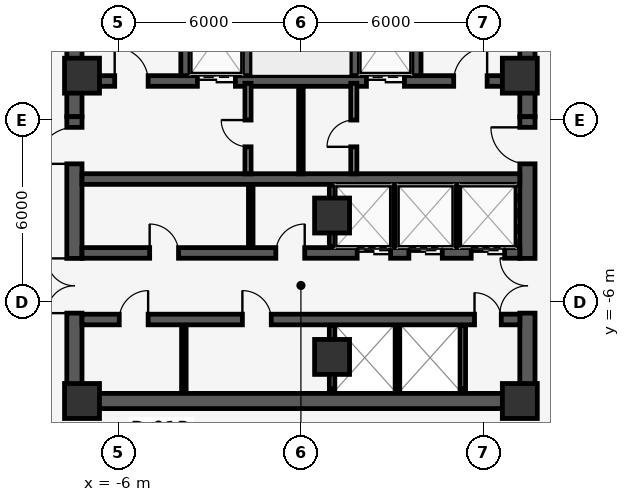
"""IFC4 building model, lengths in metres.
Left out: names, types, materials, properties, quantities, classifications, styles, units other than length and angle.
Written with IfcOpenShell. Run it as: python <this file> out.ifc"""

import sys

from ifc_helpers import new_model, si_unit, direction, frame, frame_2d, origin, origin_2d, place, context, subcontext, project, spatial, rectangle, extrude, element, fill, save


model = new_model("IFC4")
c1 = context("Model", 3, precision=1e-05, world=origin(), true_north=direction((0.0, 1.0)))
c2 = subcontext(c1, "Body", "Model", "MODEL_VIEW")
j1 = project(units=[si_unit("LENGTHUNIT", "METRE"), si_unit("PLANEANGLEUNIT", "RADIAN")], contexts=[c1])
p1 = place(None, origin())
s1 = spatial("IfcSite", under=j1, at=p1, CompositionType="ELEMENT")
p2 = place(p1, origin())
s2 = spatial("IfcBuilding", under=s1, at=p2, CompositionType="ELEMENT")
p3 = place(p2, frame((0.0, 0.0, 236.3)))
s3 = spatial("IfcBuildingStorey", under=s2, at=p3, CompositionType="ELEMENT", Elevation=236.3)
p4 = place(p3, frame((-7.2, 1.275, 0.0), z_axis=(0.0, 0.0, 1.0), x_axis=(1.0, 0.0, 0.0)))
e1 = element("IfcWall", 1, at=p4, inside=s3, PredefinedType="SHEAR", context=c2, shape_type="SweptSolid", body=[
    extrude(rectangle(XDim=14.4, YDim=0.35, at=frame_2d((7.2, 0.0))), origin(), (0.0, 0.0, 1.0), 3.85),
])
p5 = place(p4, frame((3.795, 0.0, 0.0)))
e2 = element("IfcOpeningElement", 2, at=p5, cuts=e1, PredefinedType="OPENING", context=c2, shape_type="SweptSolid", body=[
    extrude(rectangle(XDim=1.25, YDim=2.25, at=frame_2d((0.625, 1.125))), frame((0.0, 0.185, 0.0), z_axis=(0.0, -1.0, 0.0), x_axis=(1.0, 0.0, 0.0)), (0.0, 0.0, 1.0), 0.37),
])
p6 = place(p4, frame((9.355, 0.0, 0.0)))
e3 = element("IfcOpeningElement", 3, at=p6, cuts=e1, PredefinedType="OPENING", context=c2, shape_type="SweptSolid", body=[
    extrude(rectangle(XDim=1.25, YDim=2.25, at=frame_2d((0.625, 1.125))), frame((0.0, 0.185, 0.0), z_axis=(0.0, -1.0, 0.0), x_axis=(1.0, 0.0, 0.0)), (0.0, 0.0, 1.0), 0.37),
])
p7 = place(p4, frame((1.075, 0.0, 0.0)))
e4 = element("IfcOpeningElement", 4, at=p7, cuts=e1, PredefinedType="OPENING", context=c2, shape_type="SweptSolid", body=[
    extrude(rectangle(XDim=1.1, YDim=2.15, at=frame_2d((0.55, 1.075))), frame((0.0, 0.185, 0.0), z_axis=(0.0, -1.0, 0.0), x_axis=(1.0, 0.0, 0.0)), (0.0, 0.0, 1.0), 0.37),
])
p8 = place(p4, frame((12.225, 0.0, 0.0)))
e5 = element("IfcOpeningElement", 5, at=p8, cuts=e1, PredefinedType="OPENING", context=c2, shape_type="SweptSolid", body=[
    extrude(rectangle(XDim=1.1, YDim=2.15, at=frame_2d((0.55, 1.075))), frame((0.0, 0.185, 0.0), z_axis=(0.0, -1.0, 0.0), x_axis=(1.0, 0.0, 0.0)), (0.0, 0.0, 1.0), 0.37),
])
for number, where, z_axis, x_axis in (
    (6, (-3.8, 1.45, 0.0), (0.0, 0.0, 1.0), (0.0, 1.0, 0.0)),
    (7, (-1.775, 1.45, 0.0), (0.0, 0.0, 1.0), (0.0, 1.0, 0.0)),
    (8, (1.775, 1.45, 0.0), (0.0, 0.0, 1.0), (0.0, 1.0, 0.0)),
    (9, (3.8, 1.45, 0.0), (0.0, 0.0, 1.0), (0.0, 1.0, 0.0)),
):
    element("IfcWall", number, at=place(p3, frame(where, z_axis=z_axis, x_axis=x_axis)), inside=s3, PredefinedType="SHEAR", context=c2, shape_type="SweptSolid", body=[
        extrude(rectangle(XDim=7.7, YDim=0.3, at=frame_2d((3.85, 0.0))), origin(), (0.0, 0.0, 1.0), 3.85),
    ])
for number, where, z_axis, x_axis in (
    (10, (-7.45, 0.1, 0.0), (0.0, 0.0, 1.0), (0.0, 1.0, 0.0)),
    (11, (7.45, 0.1, 0.0), (0.0, 0.0, 1.0), (0.0, 1.0, 0.0)),
):
    element("IfcWall", number, at=place(p3, frame(where, z_axis=z_axis, x_axis=x_axis)), inside=s3, PredefinedType="SHEAR", context=c2, shape_type="SweptSolid", body=[
        extrude(rectangle(XDim=9.05, YDim=0.5, at=frame_2d((4.525, 0.0))), origin(), (0.0, 0.0, 1.0), 3.85),
    ])
p9 = place(p3, frame((-7.45, -9.0, 0.0), z_axis=(0.0, 0.0, 1.0), x_axis=(0.0, 1.0, 0.0)))
e12 = element("IfcWall", 12, at=p9, inside=s3, PredefinedType="SHEAR", context=c2, shape_type="SweptSolid", body=[
    extrude(rectangle(XDim=9.1, YDim=0.5, at=frame_2d((4.55, 0.0))), origin(), (0.0, 0.0, 1.0), 3.85),
])
p10 = place(p9, frame((2.64, 0.0, 0.0)))
e13 = element("IfcOpeningElement", 13, at=p10, cuts=e12, PredefinedType="OPENING", context=c2, shape_type="SweptSolid", body=[
    extrude(rectangle(XDim=1.8, YDim=2.2, at=frame_2d((0.9, 1.1))), frame((0.0, 0.26, 0.0), z_axis=(0.0, -1.0, 0.0), x_axis=(1.0, 0.0, 0.0)), (0.0, 0.0, 1.0), 0.52),
])
p11 = place(p9, frame((7.55, 0.0, 0.0)))
e14 = element("IfcOpeningElement", 14, at=p11, cuts=e12, PredefinedType="OPENING", context=c2, shape_type="SweptSolid", body=[
    extrude(rectangle(XDim=1.2, YDim=2.15, at=frame_2d((0.6, 1.075))), frame((0.0, 0.26, 0.0), z_axis=(0.0, -1.0, 0.0), x_axis=(1.0, 0.0, 0.0)), (0.0, 0.0, 1.0), 0.52),
])
p12 = place(p3, frame((7.45, -9.0, 0.0), z_axis=(0.0, 0.0, 1.0), x_axis=(0.0, 1.0, 0.0)))
e15 = element("IfcWall", 15, at=p12, inside=s3, PredefinedType="SHEAR", context=c2, shape_type="SweptSolid", body=[
    extrude(rectangle(XDim=9.1, YDim=0.5, at=frame_2d((4.55, 0.0))), origin(), (0.0, 0.0, 1.0), 3.85),
])
p13 = place(p12, frame((2.64, 0.0, 0.0)))
e16 = element("IfcOpeningElement", 16, at=p13, cuts=e15, PredefinedType="OPENING", context=c2, shape_type="SweptSolid", body=[
    extrude(rectangle(XDim=1.8, YDim=2.2, at=frame_2d((0.9, 1.1))), frame((0.0, 0.26, 0.0), z_axis=(0.0, -1.0, 0.0), x_axis=(1.0, 0.0, 0.0)), (0.0, 0.0, 1.0), 0.52),
])
p14 = place(p12, frame((7.55, 0.0, 0.0)))
e17 = element("IfcOpeningElement", 17, at=p14, cuts=e15, PredefinedType="OPENING", context=c2, shape_type="SweptSolid", body=[
    extrude(rectangle(XDim=1.2, YDim=2.15, at=frame_2d((0.6, 1.075))), frame((0.0, 0.26, 0.0), z_axis=(0.0, -1.0, 0.0), x_axis=(1.0, 0.0, 0.0)), (0.0, 0.0, 1.0), 0.52),
])
p15 = place(p3, frame((-7.45, -9.25, 0.0), z_axis=(0.0, 0.0, 1.0), x_axis=(1.0, 0.0, 0.0)))
e18 = element("IfcWall", 18, at=p15, inside=s3, PredefinedType="SHEAR", context=c2, shape_type="SweptSolid", body=[
    extrude(rectangle(XDim=14.9, YDim=0.5, at=frame_2d((7.45, 0.0))), origin(), (0.0, 0.0, 1.0), 3.85),
])
p16 = place(p3, frame((-7.2, -1.95, 0.0), z_axis=(0.0, 0.0, 1.0), x_axis=(1.0, 0.0, 0.0)))
e19 = element("IfcWall", 19, at=p16, inside=s3, PredefinedType="SHEAR", context=c2, shape_type="SweptSolid", body=[
    extrude(rectangle(XDim=14.4, YDim=0.35, at=frame_2d((7.2, 0.0))), origin(), (0.0, 0.0, 1.0), 3.85),
])
p17 = place(p3, frame((-7.2, -4.38, 0.0), z_axis=(0.0, 0.0, 1.0), x_axis=(1.0, 0.0, 0.0)))
e20 = element("IfcWall", 20, at=p17, inside=s3, PredefinedType="SHEAR", context=c2, shape_type="SweptSolid", body=[
    extrude(rectangle(XDim=14.4, YDim=0.35, at=frame_2d((7.2, 0.0))), origin(), (0.0, 0.0, 1.0), 3.85),
])
p18 = place(p17, frame((9.05, 0.0, 0.0)))
e21 = element("IfcOpeningElement", 21, at=p18, cuts=e20, PredefinedType="OPENING", context=c2, shape_type="SweptSolid", body=[
    extrude(rectangle(XDim=1.1, YDim=2.2, at=frame_2d((0.55, 1.1))), frame((0.0, 0.185, 0.0), z_axis=(0.0, -1.0, 0.0), x_axis=(1.0, 0.0, 0.0)), (0.0, 0.0, 1.0), 0.37),
])
p19 = place(p17, frame((10.75, 0.0, 0.0)))
e22 = element("IfcOpeningElement", 22, at=p19, cuts=e20, PredefinedType="OPENING", context=c2, shape_type="SweptSolid", body=[
    extrude(rectangle(XDim=1.1, YDim=2.2, at=frame_2d((0.55, 1.1))), frame((0.0, 0.185, 0.0), z_axis=(0.0, -1.0, 0.0), x_axis=(1.0, 0.0, 0.0)), (0.0, 0.0, 1.0), 0.37),
])
p20 = place(p17, frame((12.8, 0.0, 0.0)))
e23 = element("IfcOpeningElement", 23, at=p20, cuts=e20, PredefinedType="OPENING", context=c2, shape_type="SweptSolid", body=[
    extrude(rectangle(XDim=1.1, YDim=2.2, at=frame_2d((0.55, 1.1))), frame((0.0, 0.185, 0.0), z_axis=(0.0, -1.0, 0.0), x_axis=(1.0, 0.0, 0.0)), (0.0, 0.0, 1.0), 0.37),
])
p21 = place(p17, frame((2.225, 0.0, 0.0)))
e24 = element("IfcOpeningElement", 24, at=p21, cuts=e20, PredefinedType="OPENING", context=c2, shape_type="SweptSolid", body=[
    extrude(rectangle(XDim=0.95, YDim=2.15, at=frame_2d((0.475, 1.075))), frame((0.0, 0.185, 0.0), z_axis=(0.0, -1.0, 0.0), x_axis=(1.0, 0.0, 0.0)), (0.0, 0.0, 1.0), 0.37),
])
p22 = place(p17, frame((6.375, 0.0, 0.0)))
e25 = element("IfcOpeningElement", 25, at=p22, cuts=e20, PredefinedType="OPENING", context=c2, shape_type="SweptSolid", body=[
    extrude(rectangle(XDim=0.95, YDim=2.15, at=frame_2d((0.475, 1.075))), frame((0.0, 0.185, 0.0), z_axis=(0.0, -1.0, 0.0), x_axis=(1.0, 0.0, 0.0)), (0.0, 0.0, 1.0), 0.37),
])
p23 = place(p3, frame((-7.2, -6.57, 0.0), z_axis=(0.0, 0.0, 1.0), x_axis=(1.0, 0.0, 0.0)))
e26 = element("IfcWall", 26, at=p23, inside=s3, PredefinedType="SHEAR", context=c2, shape_type="SweptSolid", body=[
    extrude(rectangle(XDim=14.4, YDim=0.35, at=frame_2d((7.2, 0.0))), origin(), (0.0, 0.0, 1.0), 3.85),
])
p24 = place(p23, frame((1.225, 0.0, 0.0)))
e27 = element("IfcOpeningElement", 27, at=p24, cuts=e26, PredefinedType="OPENING", context=c2, shape_type="SweptSolid", body=[
    extrude(rectangle(XDim=0.95, YDim=2.15, at=frame_2d((0.475, 1.075))), frame((0.0, 0.185, 0.0), z_axis=(0.0, -1.0, 0.0), x_axis=(1.0, 0.0, 0.0)), (0.0, 0.0, 1.0), 0.37),
])
p25 = place(p23, frame((5.275, 0.0, 0.0)))
e28 = element("IfcOpeningElement", 28, at=p25, cuts=e26, PredefinedType="OPENING", context=c2, shape_type="SweptSolid", body=[
    extrude(rectangle(XDim=0.95, YDim=2.15, at=frame_2d((0.475, 1.075))), frame((0.0, 0.185, 0.0), z_axis=(0.0, -1.0, 0.0), x_axis=(1.0, 0.0, 0.0)), (0.0, 0.0, 1.0), 0.37),
])
p26 = place(p23, frame((12.91, 0.0, 0.0)))
e29 = element("IfcOpeningElement", 29, at=p26, cuts=e26, PredefinedType="OPENING", context=c2, shape_type="SweptSolid", body=[
    extrude(rectangle(XDim=0.88, YDim=2.15, at=frame_2d((0.44, 1.075))), frame((0.0, 0.185, 0.0), z_axis=(0.0, -1.0, 0.0), x_axis=(1.0, 0.0, 0.0)), (0.0, 0.0, 1.0), 0.37),
])
for number, where, z_axis, x_axis in (
    (30, (-7.2, -9.25, 0.0), (0.0, 0.0, 1.0), (1.0, 0.0, 0.0)),
    (31, (7.2, -9.25, 0.0), (0.0, 0.0, 1.0), (1.0, 0.0, 0.0)),
    (32, (7.2, 1.45, 0.0), (0.0, 0.0, 1.0), (1.0, 0.0, 0.0)),
    (33, (-7.2, 1.45, 0.0), (0.0, 0.0, 1.0), (1.0, 0.0, 0.0)),
    (34, (1.025, -3.15, 0.0), (0.0, 0.0, 1.0), (1.0, 0.0, 0.0)),
    (35, (1.025, -7.8, 0.0), (0.0, 0.0, 1.0), (1.0, 0.0, 0.0)),
):
    element("IfcColumn", number, at=place(p3, frame(where, z_axis=z_axis, x_axis=x_axis)), inside=s3, PredefinedType="COLUMN", context=c2, shape_type="SweptSolid", body=[
        extrude(rectangle(XDim=1.15, YDim=1.15, at=origin_2d()), origin(), (0.0, 0.0, 1.0), 4.1),
    ])
p27 = place(p3, frame((30.935, 2.916, 0.0), z_axis=(0.0, 0.0, 1.0), x_axis=(-0.743143233829, -0.66913237406, 0.0)))
e36 = element("IfcWall", 36, at=p27, inside=s3, PredefinedType="STANDARD", context=c2, shape_type="SweptSolid", body=[
    extrude(rectangle(XDim=49.88, YDim=0.28, at=frame_2d((24.94, 0.0))), origin(), (0.0, 0.0, 1.0), 3.85),
])
p28 = place(p27, frame((24.44, 0.0, 0.0)))
e37 = element("IfcOpeningElement", 37, at=p28, cuts=e36, PredefinedType="OPENING", context=c2, shape_type="SweptSolid", body=[
    extrude(rectangle(XDim=1.0, YDim=2.15, at=frame_2d((0.5, 1.075))), frame((0.0, 0.15, 0.0), z_axis=(0.0, -1.0, 0.0), x_axis=(1.0, 0.0, 0.0)), (0.0, 0.0, 1.0), 0.3),
])
p29 = place(p27, frame((4.74, 0.0, 0.85)))
e38 = element("IfcOpeningElement", 38, at=p29, cuts=e36, PredefinedType="OPENING", context=c2, shape_type="SweptSolid", body=[
    extrude(rectangle(XDim=1.2, YDim=2.2, at=frame_2d((0.6, 1.1))), frame((0.0, 0.15, 0.0), z_axis=(0.0, -1.0, 0.0), x_axis=(1.0, 0.0, 0.0)), (0.0, 0.0, 1.0), 0.3),
])
p30 = place(p27, frame((10.34, 0.0, 0.85)))
e39 = element("IfcOpeningElement", 39, at=p30, cuts=e36, PredefinedType="OPENING", context=c2, shape_type="SweptSolid", body=[
    extrude(rectangle(XDim=1.2, YDim=2.2, at=frame_2d((0.6, 1.1))), frame((0.0, 0.15, 0.0), z_axis=(0.0, -1.0, 0.0), x_axis=(1.0, 0.0, 0.0)), (0.0, 0.0, 1.0), 0.3),
])
p31 = place(p27, frame((27.14, 0.0, 0.85)))
e40 = element("IfcOpeningElement", 40, at=p31, cuts=e36, PredefinedType="OPENING", context=c2, shape_type="SweptSolid", body=[
    extrude(rectangle(XDim=1.2, YDim=2.2, at=frame_2d((0.6, 1.1))), frame((0.0, 0.15, 0.0), z_axis=(0.0, -1.0, 0.0), x_axis=(1.0, 0.0, 0.0)), (0.0, 0.0, 1.0), 0.3),
])
p32 = place(p27, frame((38.34, 0.0, 0.85)))
e41 = element("IfcOpeningElement", 41, at=p32, cuts=e36, PredefinedType="OPENING", context=c2, shape_type="SweptSolid", body=[
    extrude(rectangle(XDim=1.2, YDim=2.2, at=frame_2d((0.6, 1.1))), frame((0.0, 0.15, 0.0), z_axis=(0.0, -1.0, 0.0), x_axis=(1.0, 0.0, 0.0)), (0.0, 0.0, 1.0), 0.3),
])
p33 = place(p27, frame((43.94, 0.0, 0.85)))
e42 = element("IfcOpeningElement", 42, at=p33, cuts=e36, PredefinedType="OPENING", context=c2, shape_type="SweptSolid", body=[
    extrude(rectangle(XDim=1.2, YDim=2.2, at=frame_2d((0.6, 1.1))), frame((0.0, 0.15, 0.0), z_axis=(0.0, -1.0, 0.0), x_axis=(1.0, 0.0, 0.0)), (0.0, 0.0, 1.0), 0.3),
])
p34 = place(p3, frame((1.025, -4.18, 0.0), z_axis=(0.0, 0.0, 1.0), x_axis=(0.0, 1.0, 0.0)))
e43 = element("IfcWall", 43, at=p34, inside=s3, PredefinedType="PARTITIONING", context=c2, shape_type="SweptSolid", body=[
    extrude(rectangle(XDim=2.03, YDim=0.18, at=frame_2d((1.015, 0.0))), origin(), (0.0, 0.0, 1.0), 2.898),
])
for number, where, z_axis, x_axis in (
    (44, (-1.65, -4.18, 0.0), (0.0, 0.0, 1.0), (0.0, 1.0, 0.0)),
    (45, (3.075, -4.18, 0.0), (0.0, 0.0, 1.0), (0.0, 1.0, 0.0)),
    (46, (5.125, -4.18, 0.0), (0.0, 0.0, 1.0), (0.0, 1.0, 0.0)),
):
    element("IfcWall", number, at=place(p3, frame(where, z_axis=z_axis, x_axis=x_axis)), inside=s3, PredefinedType="PARTITIONING", context=c2, shape_type="SweptSolid", body=[
        extrude(rectangle(XDim=2.03, YDim=0.15, at=frame_2d((1.015, 0.0))), origin(), (0.0, 0.0, 1.0), 3.85),
    ])
p35 = place(p3, frame((1.025, -8.85, 0.0), z_axis=(0.0, 0.0, 1.0), x_axis=(0.0, 1.0, 0.0)))
e47 = element("IfcWall", 47, at=p35, inside=s3, PredefinedType="PARTITIONING", context=c2, shape_type="SweptSolid", body=[
    extrude(rectangle(XDim=2.08, YDim=0.18, at=frame_2d((1.04, 0.0))), origin(), (0.0, 0.0, 1.0), 2.898),
])
for number, where, z_axis, x_axis in (
    (48, (-3.85, -8.85, 0.0), (0.0, 0.0, 1.0), (0.0, 1.0, 0.0)),
    (49, (3.175, -8.85, 0.0), (0.0, 0.0, 1.0), (0.0, 1.0, 0.0)),
):
    element("IfcWall", number, at=place(p3, frame(where, z_axis=z_axis, x_axis=x_axis)), inside=s3, PredefinedType="PARTITIONING", context=c2, shape_type="SweptSolid", body=[
        extrude(rectangle(XDim=2.08, YDim=0.15, at=frame_2d((1.04, 0.0))), origin(), (0.0, 0.0, 1.0), 3.85),
    ])
p36 = place(p3, frame((5.325, -8.85, 0.0), z_axis=(0.0, 0.0, 1.0), x_axis=(0.0, 1.0, 0.0)))
e50 = element("IfcWall", 50, at=p36, inside=s3, PredefinedType="PARTITIONING", context=c2, shape_type="SweptSolid", body=[
    extrude(rectangle(XDim=2.08, YDim=0.18, at=frame_2d((1.04, 0.0))), origin(), (0.0, 0.0, 1.0), 3.85),
])
p37 = place(p3, frame((-1.74, -1.78, 0.0), z_axis=(0.0, 0.0, 1.0), x_axis=(0.0, 1.0, 0.0)))
e51 = element("IfcWall", 51, at=p37, inside=s3, PredefinedType="PARTITIONING", context=c2, shape_type="SweptSolid", body=[
    extrude(rectangle(XDim=2.98, YDim=0.2, at=frame_2d((1.49, 0.0))), origin(), (0.0, 0.0, 1.0), 3.85),
])
p38 = place(p37, frame((0.89, 0.0, 0.0)))
e52 = element("IfcOpeningElement", 52, at=p38, cuts=e51, PredefinedType="OPENING", context=c2, shape_type="SweptSolid", body=[
    extrude(rectangle(XDim=0.88, YDim=2.15, at=frame_2d((0.44, 1.075))), frame((0.0, 0.11, 0.0), z_axis=(0.0, -1.0, 0.0), x_axis=(1.0, 0.0, 0.0)), (0.0, 0.0, 1.0), 0.22),
])
p39 = place(p3, frame((1.74, -1.78, 0.0), z_axis=(0.0, 0.0, 1.0), x_axis=(0.0, 1.0, 0.0)))
e53 = element("IfcWall", 53, at=p39, inside=s3, PredefinedType="PARTITIONING", context=c2, shape_type="SweptSolid", body=[
    extrude(rectangle(XDim=2.98, YDim=0.2, at=frame_2d((1.49, 0.0))), origin(), (0.0, 0.0, 1.0), 3.85),
])
p40 = place(p39, frame((0.89, 0.0, 0.0)))
e54 = element("IfcOpeningElement", 54, at=p40, cuts=e53, PredefinedType="OPENING", context=c2, shape_type="SweptSolid", body=[
    extrude(rectangle(XDim=0.88, YDim=2.15, at=frame_2d((0.44, 1.075))), frame((0.0, 0.11, 0.0), z_axis=(0.0, -1.0, 0.0), x_axis=(1.0, 0.0, 0.0)), (0.0, 0.0, 1.0), 0.22),
])
p41 = place(p3, frame((0.0, -1.78, 0.0), z_axis=(0.0, 0.0, 1.0), x_axis=(0.0, 1.0, 0.0)))
e55 = element("IfcWall", 55, at=p41, inside=s3, PredefinedType="PARTITIONING", context=c2, shape_type="SweptSolid", body=[
    extrude(rectangle(XDim=2.83, YDim=0.15, at=frame_2d((1.415, 0.0))), origin(), (0.0, 0.0, 1.0), 3.85),
])
p42 = place(p18, origin())
e56 = element("IfcDoor", 56, at=p42, inside=s3, OperationType="DOUBLE_DOOR_SLIDING", PredefinedType="DOOR", context=c2, shape_type="SweptSolid", body=[
    extrude(rectangle(XDim=1.1, YDim=2.2, at=frame_2d((0.55, 1.1))), frame((0.0, 0.025, 0.0), z_axis=(0.0, -1.0, 0.0), x_axis=(1.0, 0.0, 0.0)), (0.0, 0.0, 1.0), 0.05),
])
fill(e21, e56)
p43 = place(p19, origin())
e57 = element("IfcDoor", 57, at=p43, inside=s3, OperationType="DOUBLE_DOOR_SLIDING", PredefinedType="DOOR", context=c2, shape_type="SweptSolid", body=[
    extrude(rectangle(XDim=1.1, YDim=2.2, at=frame_2d((0.55, 1.1))), frame((0.0, 0.025, 0.0), z_axis=(0.0, -1.0, 0.0), x_axis=(1.0, 0.0, 0.0)), (0.0, 0.0, 1.0), 0.05),
])
fill(e22, e57)
p44 = place(p20, origin())
e58 = element("IfcDoor", 58, at=p44, inside=s3, OperationType="DOUBLE_DOOR_SLIDING", PredefinedType="DOOR", context=c2, shape_type="SweptSolid", body=[
    extrude(rectangle(XDim=1.1, YDim=2.2, at=frame_2d((0.55, 1.1))), frame((0.0, 0.025, 0.0), z_axis=(0.0, -1.0, 0.0), x_axis=(1.0, 0.0, 0.0)), (0.0, 0.0, 1.0), 0.05),
])
fill(e23, e58)
p45 = place(p5, origin())
e59 = element("IfcDoor", 59, at=p45, inside=s3, OperationType="DOUBLE_DOOR_SLIDING", PredefinedType="DOOR", context=c2, shape_type="SweptSolid", body=[
    extrude(rectangle(XDim=1.25, YDim=2.25, at=frame_2d((0.625, 1.125))), frame((0.0, 0.025, 0.0), z_axis=(0.0, -1.0, 0.0), x_axis=(1.0, 0.0, 0.0)), (0.0, 0.0, 1.0), 0.05),
])
fill(e2, e59)
p46 = place(p6, origin())
e60 = element("IfcDoor", 60, at=p46, inside=s3, OperationType="DOUBLE_DOOR_SLIDING", PredefinedType="DOOR", context=c2, shape_type="SweptSolid", body=[
    extrude(rectangle(XDim=1.25, YDim=2.25, at=frame_2d((0.625, 1.125))), frame((0.0, 0.025, 0.0), z_axis=(0.0, -1.0, 0.0), x_axis=(1.0, 0.0, 0.0)), (0.0, 0.0, 1.0), 0.05),
])
fill(e3, e60)
p47 = place(p7, origin())
e61 = element("IfcDoor", 61, at=p47, inside=s3, OperationType="SINGLE_SWING_LEFT", PredefinedType="DOOR", context=c2, shape_type="SweptSolid", body=[
    extrude(rectangle(XDim=1.1, YDim=2.15, at=frame_2d((0.55, 1.075))), frame((0.0, 0.025, 0.0), z_axis=(0.0, -1.0, 0.0), x_axis=(1.0, 0.0, 0.0)), (0.0, 0.0, 1.0), 0.05),
])
fill(e4, e61)
p48 = place(p8, origin())
e62 = element("IfcDoor", 62, at=p48, inside=s3, OperationType="SINGLE_SWING_RIGHT", PredefinedType="DOOR", context=c2, shape_type="SweptSolid", body=[
    extrude(rectangle(XDim=1.1, YDim=2.15, at=frame_2d((0.55, 1.075))), frame((0.0, 0.025, 0.0), z_axis=(0.0, -1.0, 0.0), x_axis=(1.0, 0.0, 0.0)), (0.0, 0.0, 1.0), 0.05),
])
fill(e5, e62)
p49 = place(p10, origin())
e63 = element("IfcDoor", 63, at=p49, inside=s3, OperationType="DOUBLE_DOOR_SINGLE_SWING", PredefinedType="DOOR", context=c2, shape_type="SweptSolid", body=[
    extrude(rectangle(XDim=1.8, YDim=2.2, at=frame_2d((0.9, 1.1))), frame((0.0, 0.025, 0.0), z_axis=(0.0, -1.0, 0.0), x_axis=(1.0, 0.0, 0.0)), (0.0, 0.0, 1.0), 0.05),
])
fill(e13, e63)
p50 = place(p11, origin())
e64 = element("IfcDoor", 64, at=p50, inside=s3, OperationType="SINGLE_SWING_LEFT", PredefinedType="DOOR", context=c2, shape_type="SweptSolid", body=[
    extrude(rectangle(XDim=1.2, YDim=2.15, at=frame_2d((0.6, 1.075))), frame((0.0, 0.025, 0.0), z_axis=(0.0, -1.0, 0.0), x_axis=(1.0, 0.0, 0.0)), (0.0, 0.0, 1.0), 0.05),
])
fill(e14, e64)
p51 = place(p13, origin())
e65 = element("IfcDoor", 65, at=p51, inside=s3, OperationType="DOUBLE_DOOR_SINGLE_SWING", PredefinedType="DOOR", context=c2, shape_type="SweptSolid", body=[
    extrude(rectangle(XDim=1.8, YDim=2.2, at=frame_2d((0.9, 1.1))), frame((0.0, 0.025, 0.0), z_axis=(0.0, -1.0, 0.0), x_axis=(1.0, 0.0, 0.0)), (0.0, 0.0, 1.0), 0.05),
])
fill(e16, e65)
p52 = place(p14, origin())
e66 = element("IfcDoor", 66, at=p52, inside=s3, OperationType="SINGLE_SWING_RIGHT", PredefinedType="DOOR", context=c2, shape_type="SweptSolid", body=[
    extrude(rectangle(XDim=1.2, YDim=2.15, at=frame_2d((0.6, 1.075))), frame((0.0, 0.025, 0.0), z_axis=(0.0, -1.0, 0.0), x_axis=(1.0, 0.0, 0.0)), (0.0, 0.0, 1.0), 0.05),
])
fill(e17, e66)
p53 = place(p21, origin())
e67 = element("IfcDoor", 67, at=p53, inside=s3, OperationType="SINGLE_SWING_LEFT", PredefinedType="DOOR", context=c2, shape_type="SweptSolid", body=[
    extrude(rectangle(XDim=0.95, YDim=2.15, at=frame_2d((0.475, 1.075))), frame((0.0, 0.025, 0.0), z_axis=(0.0, -1.0, 0.0), x_axis=(1.0, 0.0, 0.0)), (0.0, 0.0, 1.0), 0.05),
])
fill(e24, e67)
p54 = place(p22, origin())
e68 = element("IfcDoor", 68, at=p54, inside=s3, OperationType="SINGLE_SWING_RIGHT", PredefinedType="DOOR", context=c2, shape_type="SweptSolid", body=[
    extrude(rectangle(XDim=0.95, YDim=2.15, at=frame_2d((0.475, 1.075))), frame((0.0, 0.025, 0.0), z_axis=(0.0, -1.0, 0.0), x_axis=(1.0, 0.0, 0.0)), (0.0, 0.0, 1.0), 0.05),
])
fill(e25, e68)
p55 = place(p24, origin())
e69 = element("IfcDoor", 69, at=p55, inside=s3, OperationType="SINGLE_SWING_RIGHT", PredefinedType="DOOR", context=c2, shape_type="SweptSolid", body=[
    extrude(rectangle(XDim=0.95, YDim=2.15, at=frame_2d((0.475, 1.075))), frame((0.0, 0.025, 0.0), z_axis=(0.0, -1.0, 0.0), x_axis=(1.0, 0.0, 0.0)), (0.0, 0.0, 1.0), 0.05),
])
fill(e27, e69)
p56 = place(p25, origin())
e70 = element("IfcDoor", 70, at=p56, inside=s3, OperationType="SINGLE_SWING_LEFT", PredefinedType="DOOR", context=c2, shape_type="SweptSolid", body=[
    extrude(rectangle(XDim=0.95, YDim=2.15, at=frame_2d((0.475, 1.075))), frame((0.0, 0.025, 0.0), z_axis=(0.0, -1.0, 0.0), x_axis=(1.0, 0.0, 0.0)), (0.0, 0.0, 1.0), 0.05),
])
fill(e28, e70)
p57 = place(p26, origin())
e71 = element("IfcDoor", 71, at=p57, inside=s3, OperationType="SINGLE_SWING_LEFT", PredefinedType="DOOR", context=c2, shape_type="SweptSolid", body=[
    extrude(rectangle(XDim=0.88, YDim=2.15, at=frame_2d((0.44, 1.075))), frame((0.0, 0.025, 0.0), z_axis=(0.0, -1.0, 0.0), x_axis=(1.0, 0.0, 0.0)), (0.0, 0.0, 1.0), 0.05),
])
fill(e29, e71)
p58 = place(p38, origin())
e72 = element("IfcDoor", 72, at=p58, inside=s3, OperationType="SINGLE_SWING_RIGHT", PredefinedType="DOOR", context=c2, shape_type="SweptSolid", body=[
    extrude(rectangle(XDim=0.88, YDim=2.15, at=frame_2d((0.44, 1.075))), frame((0.0, 0.025, 0.0), z_axis=(0.0, -1.0, 0.0), x_axis=(1.0, 0.0, 0.0)), (0.0, 0.0, 1.0), 0.05),
])
fill(e52, e72)
p59 = place(p40, origin())
e73 = element("IfcDoor", 73, at=p59, inside=s3, OperationType="SINGLE_SWING_LEFT", PredefinedType="DOOR", context=c2, shape_type="SweptSolid", body=[
    extrude(rectangle(XDim=0.88, YDim=2.15, at=frame_2d((0.44, 1.075))), frame((0.0, 0.025, 0.0), z_axis=(0.0, -1.0, 0.0), x_axis=(1.0, 0.0, 0.0)), (0.0, 0.0, 1.0), 0.05),
])
fill(e54, e73)
save(model, sys.argv[1])
